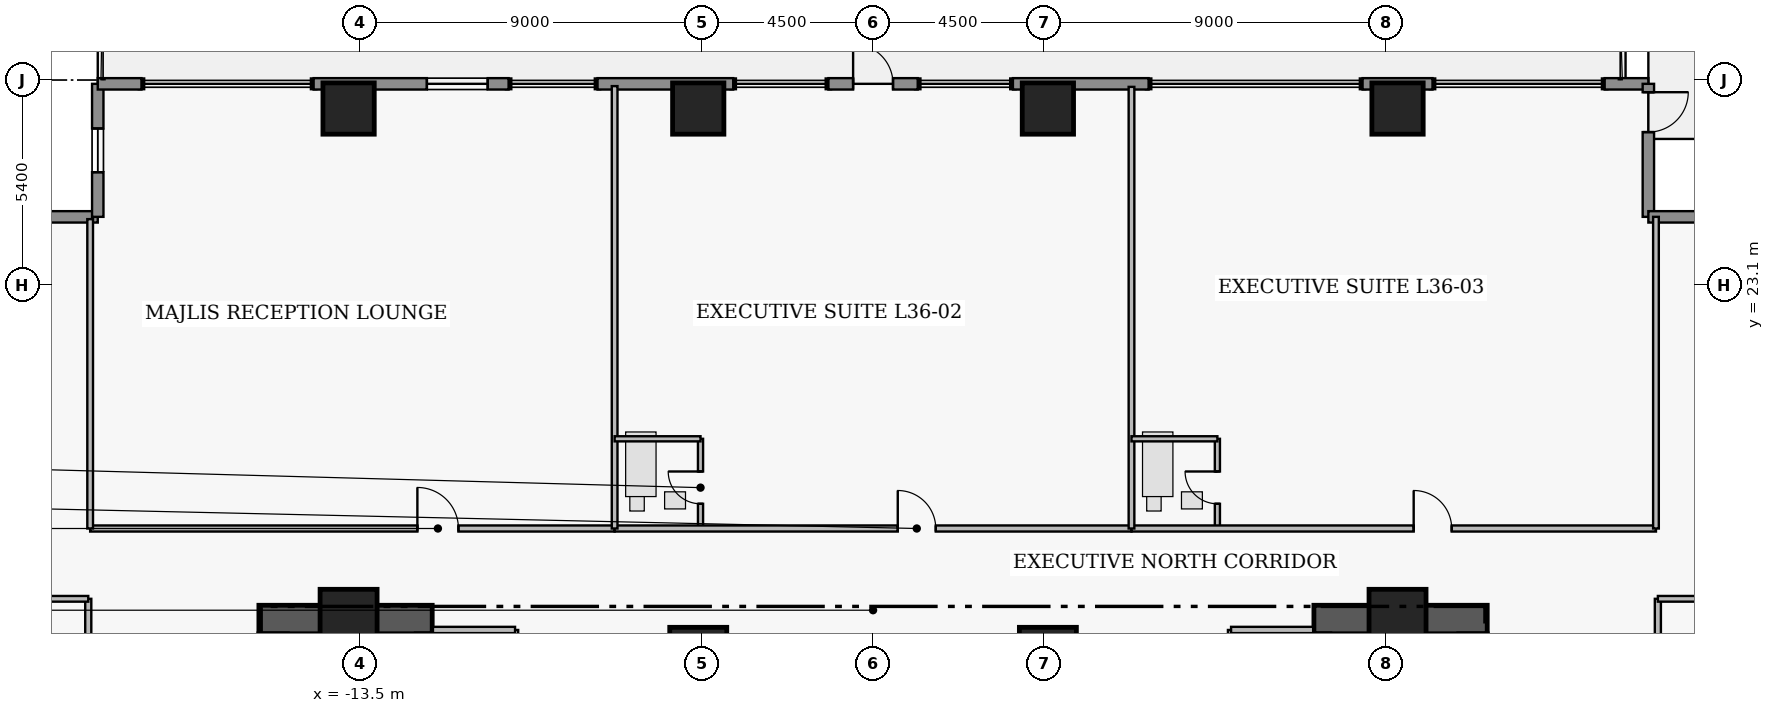
"""IFC4 building model, lengths in metres.
Left out: names, types, materials, properties, quantities, classifications, styles, units other than length and angle.
Written with IfcOpenShell. Run it as: python <this file> out.ifc"""

import sys

from ifc_helpers import new_model, si_unit, direction, frame, frame_2d, origin, origin_2d, place, context, subcontext, project, spatial, rectangle, extrude, element, fill, save


model = new_model("IFC4")
c1 = context("Model", 3, precision=1e-05, world=origin(), true_north=direction((0.0, 1.0)))
c2 = subcontext(c1, "Body", "Model", "MODEL_VIEW")
j1 = project(units=[si_unit("LENGTHUNIT", "METRE"), si_unit("PLANEANGLEUNIT", "RADIAN")], contexts=[c1])
p1 = place(None, origin())
s1 = spatial("IfcSite", under=j1, at=p1, CompositionType="ELEMENT")
p2 = place(p1, origin())
s2 = spatial("IfcBuilding", under=s1, at=p2, CompositionType="ELEMENT")
p3 = place(p2, frame((0.0, 0.0, 143.1)))
s3 = spatial("IfcBuildingStorey", under=s2, at=p3, CompositionType="ELEMENT", Elevation=143.1)
for number, where, z_axis, x_axis in (
    (1, (-16.16, 14.305, 0.0), (0.0, 0.0, 1.0), (1.0, 0.0, 0.0)),
    (2, (11.6, 14.305, 0.0), (0.0, 0.0, 1.0), (1.0, 0.0, 0.0)),
):
    element("IfcWall", number, at=place(p3, frame(where, z_axis=z_axis, x_axis=x_axis)), inside=s3, PredefinedType="SHEAR", context=c2, shape_type="SweptSolid", body=[
        extrude(rectangle(XDim=4.56, YDim=0.75, at=frame_2d((2.28, 0.0))), origin(), (0.0, 0.0, 1.0), 3.46),
    ])
for number, where, z_axis, x_axis in (
    (3, (-13.8, 14.35, 0.0), (0.0, 0.0, 1.0), (1.0, 0.0, 0.0)),
    (4, (-4.6, 13.35, 0.0), (0.0, 0.0, 1.0), (1.0, 0.0, 0.0)),
    (5, (4.6, 13.35, 0.0), (0.0, 0.0, 1.0), (1.0, 0.0, 0.0)),
    (6, (13.8, 14.35, 0.0), (0.0, 0.0, 1.0), (1.0, 0.0, 0.0)),
):
    element("IfcColumn", number, at=place(p3, frame(where, z_axis=z_axis, x_axis=x_axis)), inside=s3, PredefinedType="COLUMN", context=c2, shape_type="SweptSolid", body=[
        extrude(rectangle(XDim=1.5, YDim=1.5, at=origin_2d()), origin(), (0.0, 0.0, 1.0), 3.65),
    ])
for number, where, z_axis, x_axis in (
    (7, (-13.8, 27.75, 0.0), (0.0, 0.0, 1.0), (1.0, 0.0, 0.0)),
    (8, (-4.6, 27.75, 0.0), (0.0, 0.0, 1.0), (1.0, 0.0, 0.0)),
    (9, (4.6, 27.75, 0.0), (0.0, 0.0, 1.0), (1.0, 0.0, 0.0)),
    (10, (13.8, 27.75, 0.0), (0.0, 0.0, 1.0), (1.0, 0.0, 0.0)),
):
    element("IfcColumn", number, at=place(p3, frame(where, z_axis=z_axis, x_axis=x_axis)), inside=s3, PredefinedType="COLUMN", context=c2, shape_type="SweptSolid", body=[
        extrude(rectangle(XDim=1.35, YDim=1.35, at=origin_2d()), origin(), (0.0, 0.0, 1.0), 3.65),
    ])
p4 = place(p3, frame((-23.9, 24.9, 0.0), z_axis=(0.0, 0.0, 1.0), x_axis=(1.0, 0.0, 0.0)))
e11 = element("IfcWall", 11, at=p4, inside=s3, PredefinedType="STANDARD", context=c2, shape_type="SweptSolid", body=[
    extrude(rectangle(XDim=3.5, YDim=0.3, at=frame_2d((1.75, 0.0))), origin(), (0.0, 0.0, 1.0), 3.43),
])
p5 = place(p4, frame((1.065, 0.0, 1.25)))
e12 = element("IfcOpeningElement", 12, at=p5, cuts=e11, PredefinedType="OPENING", context=c2, shape_type="SweptSolid", body=[
    extrude(rectangle(XDim=1.15, YDim=1.55, at=frame_2d((0.575, 0.775))), frame((0.0, 0.16, 0.0), z_axis=(0.0, -1.0, 0.0), x_axis=(1.0, 0.0, 0.0)), (0.0, 0.0, 1.0), 0.32),
])
p6 = place(p3, frame((-20.4, 24.9, 0.0), z_axis=(0.0, 0.0, 1.0), x_axis=(0.0, 1.0, 0.0)))
e13 = element("IfcWall", 13, at=p6, inside=s3, PredefinedType="STANDARD", context=c2, shape_type="SweptSolid", body=[
    extrude(rectangle(XDim=3.5, YDim=0.3, at=frame_2d((1.75, 0.0))), origin(), (0.0, 0.0, 1.0), 3.43),
])
p7 = place(p6, frame((1.175, 0.0, 1.25)))
e14 = element("IfcOpeningElement", 14, at=p7, cuts=e13, PredefinedType="OPENING", context=c2, shape_type="SweptSolid", body=[
    extrude(rectangle(XDim=1.15, YDim=1.55, at=frame_2d((0.575, 0.775))), frame((0.0, 0.16, 0.0), z_axis=(0.0, -1.0, 0.0), x_axis=(1.0, 0.0, 0.0)), (0.0, 0.0, 1.0), 0.32),
])
p8 = place(p3, frame((-20.4, 28.4, 0.0), z_axis=(0.0, 0.0, 1.0), x_axis=(1.0, 0.0, 0.0)))
e15 = element("IfcWall", 15, at=p8, inside=s3, PredefinedType="STANDARD", context=c2, shape_type="SweptSolid", body=[
    extrude(rectangle(XDim=1.15, YDim=0.3, at=frame_2d((0.575, 0.0))), origin(), (0.0, 0.0, 1.0), 3.43),
])
p9 = place(p3, frame((-14.72, 28.4, 0.0), z_axis=(0.0, 0.0, 1.0), x_axis=(1.0, 0.0, 0.0)))
e16 = element("IfcWall", 16, at=p9, inside=s3, PredefinedType="STANDARD", context=c2, shape_type="SweptSolid", body=[
    extrude(rectangle(XDim=5.13, YDim=0.3, at=frame_2d((2.565, 0.0))), origin(), (0.0, 0.0, 1.0), 3.43),
])
p10 = place(p9, frame((2.98, 0.0, 0.85)))
e17 = element("IfcOpeningElement", 17, at=p10, cuts=e16, PredefinedType="OPENING", context=c2, shape_type="SweptSolid", body=[
    extrude(rectangle(XDim=1.6, YDim=1.8, at=frame_2d((0.8, 0.9))), frame((0.0, 0.16, 0.0), z_axis=(0.0, -1.0, 0.0), x_axis=(1.0, 0.0, 0.0)), (0.0, 0.0, 1.0), 0.32),
])
p11 = place(p3, frame((-7.25, 28.4, 0.0), z_axis=(0.0, 0.0, 1.0), x_axis=(1.0, 0.0, 0.0)))
e18 = element("IfcWall", 18, at=p11, inside=s3, PredefinedType="STANDARD", context=c2, shape_type="SweptSolid", body=[
    extrude(rectangle(XDim=3.57, YDim=0.3, at=frame_2d((1.785, 0.0))), origin(), (0.0, 0.0, 1.0), 3.43),
])
p12 = place(p3, frame((-1.175, 28.4, 0.0), z_axis=(0.0, 0.0, 1.0), x_axis=(1.0, 0.0, 0.0)))
e19 = element("IfcWall", 19, at=p12, inside=s3, PredefinedType="STANDARD", context=c2, shape_type="SweptSolid", body=[
    extrude(rectangle(XDim=2.35, YDim=0.3, at=frame_2d((1.175, 0.0))), origin(), (0.0, 0.0, 1.0), 3.43),
])
p13 = place(p12, frame((0.65, 0.0, 0.0)))
e20 = element("IfcOpeningElement", 20, at=p13, cuts=e19, PredefinedType="OPENING", context=c2, shape_type="SweptSolid", body=[
    extrude(rectangle(XDim=1.05, YDim=2.2, at=frame_2d((0.525, 1.1))), frame((0.0, 0.16, 0.0), z_axis=(0.0, -1.0, 0.0), x_axis=(1.0, 0.0, 0.0)), (0.0, 0.0, 1.0), 0.32),
])
p14 = place(p3, frame((3.68, 28.4, 0.0), z_axis=(0.0, 0.0, 1.0), x_axis=(1.0, 0.0, 0.0)))
e21 = element("IfcWall", 21, at=p14, inside=s3, PredefinedType="STANDARD", context=c2, shape_type="SweptSolid", body=[
    extrude(rectangle(XDim=3.57, YDim=0.3, at=frame_2d((1.785, 0.0))), origin(), (0.0, 0.0, 1.0), 3.43),
])
p15 = place(p3, frame((12.88, 28.4, 0.0), z_axis=(0.0, 0.0, 1.0), x_axis=(1.0, 0.0, 0.0)))
e22 = element("IfcWall", 22, at=p15, inside=s3, PredefinedType="STANDARD", context=c2, shape_type="SweptSolid", body=[
    extrude(rectangle(XDim=1.84, YDim=0.3, at=frame_2d((0.92, 0.0))), origin(), (0.0, 0.0, 1.0), 3.43),
])
p16 = place(p3, frame((19.25, 28.4, 0.0), z_axis=(0.0, 0.0, 1.0), x_axis=(1.0, 0.0, 0.0)))
e23 = element("IfcWall", 23, at=p16, inside=s3, PredefinedType="STANDARD", context=c2, shape_type="SweptSolid", body=[
    extrude(rectangle(XDim=1.15, YDim=0.3, at=frame_2d((0.575, 0.0))), origin(), (0.0, 0.0, 1.0), 3.43),
])
p17 = place(p3, frame((20.4, 28.4, 0.0), z_axis=(0.0, 0.0, 1.0), x_axis=(0.0, -1.0, 0.0)))
e24 = element("IfcWall", 24, at=p17, inside=s3, PredefinedType="STANDARD", context=c2, shape_type="SweptSolid", body=[
    extrude(rectangle(XDim=3.5, YDim=0.3, at=frame_2d((1.75, 0.0))), origin(), (0.0, 0.0, 1.0), 3.43),
])
p18 = place(p17, frame((0.22, 0.0, 0.0)))
e25 = element("IfcOpeningElement", 25, at=p18, cuts=e24, PredefinedType="OPENING", context=c2, shape_type="SweptSolid", body=[
    extrude(rectangle(XDim=1.05, YDim=2.2, at=frame_2d((0.525, 1.1))), frame((0.0, 0.16, 0.0), z_axis=(0.0, -1.0, 0.0), x_axis=(1.0, 0.0, 0.0)), (0.0, 0.0, 1.0), 0.32),
])
p19 = place(p3, frame((20.4, 24.9, 0.0), z_axis=(0.0, 0.0, 1.0), x_axis=(1.0, 0.0, 0.0)))
e26 = element("IfcWall", 26, at=p19, inside=s3, PredefinedType="STANDARD", context=c2, shape_type="SweptSolid", body=[
    extrude(rectangle(XDim=3.5, YDim=0.3, at=frame_2d((1.75, 0.0))), origin(), (0.0, 0.0, 1.0), 3.43),
])
p20 = place(p19, frame((1.285, 0.0, 1.25)))
e27 = element("IfcOpeningElement", 27, at=p20, cuts=e26, PredefinedType="OPENING", context=c2, shape_type="SweptSolid", body=[
    extrude(rectangle(XDim=1.15, YDim=1.55, at=frame_2d((0.575, 0.775))), frame((0.0, 0.16, 0.0), z_axis=(0.0, -1.0, 0.0), x_axis=(1.0, 0.0, 0.0)), (0.0, 0.0, 1.0), 0.32),
])
p21 = place(p3, frame((-20.6, 16.7, 0.0), z_axis=(0.0, 0.0, 1.0), x_axis=(1.0, 0.0, 0.0)))
e28 = element("IfcWall", 28, at=p21, inside=s3, PredefinedType="PARTITIONING", context=c2, shape_type="SweptSolid", body=[
    extrude(rectangle(XDim=13.8, YDim=0.16, at=frame_2d((6.9, 0.0))), origin(), (0.0, 0.0, 1.0), 2.973),
])
p22 = place(p21, frame((8.61, 0.0, 0.0)))
e29 = element("IfcOpeningElement", 29, at=p22, cuts=e28, PredefinedType="OPENING", context=c2, shape_type="SweptSolid", body=[
    extrude(rectangle(XDim=1.08, YDim=2.18, at=frame_2d((0.54, 1.09))), frame((0.0, 0.09, 0.0), z_axis=(0.0, -1.0, 0.0), x_axis=(1.0, 0.0, 0.0)), (0.0, 0.0, 1.0), 0.18),
])
p23 = place(p3, frame((-4.54, 16.7, 0.0), z_axis=(0.0, 0.0, 1.0), x_axis=(0.0, 1.0, 0.0)))
e30 = element("IfcWall", 30, at=p23, inside=s3, PredefinedType="PLUMBINGWALL", context=c2, shape_type="SweptSolid", body=[
    extrude(rectangle(XDim=2.36, YDim=0.135, at=frame_2d((1.18, 0.0))), origin(), (0.0, 0.0, 1.0), 2.503),
])
p24 = place(p23, frame((0.65, 0.0, 0.0)))
e31 = element("IfcOpeningElement", 31, at=p24, cuts=e30, PredefinedType="OPENING", context=c2, shape_type="SweptSolid", body=[
    extrude(rectangle(XDim=0.85, YDim=2.1, at=frame_2d((0.425, 1.05))), frame((0.0, 0.077, 0.0), z_axis=(0.0, -1.0, 0.0), x_axis=(1.0, 0.0, 0.0)), (0.0, 0.0, 1.0), 0.155),
])
p25 = place(p3, frame((-6.8, 16.7, 0.0), z_axis=(0.0, 0.0, 1.0), x_axis=(1.0, 0.0, 0.0)))
e32 = element("IfcWall", 32, at=p25, inside=s3, PredefinedType="PARTITIONING", context=c2, shape_type="SweptSolid", body=[
    extrude(rectangle(XDim=13.6, YDim=0.16, at=frame_2d((6.8, 0.0))), origin(), (0.0, 0.0, 1.0), 2.973),
])
p26 = place(p25, frame((7.45, 0.0, 0.0)))
e33 = element("IfcOpeningElement", 33, at=p26, cuts=e32, PredefinedType="OPENING", context=c2, shape_type="SweptSolid", body=[
    extrude(rectangle(XDim=1.0, YDim=2.15, at=frame_2d((0.5, 1.075))), frame((0.0, 0.09, 0.0), z_axis=(0.0, -1.0, 0.0), x_axis=(1.0, 0.0, 0.0)), (0.0, 0.0, 1.0), 0.18),
])
p27 = place(p3, frame((9.06, 16.7, 0.0), z_axis=(0.0, 0.0, 1.0), x_axis=(0.0, 1.0, 0.0)))
e34 = element("IfcWall", 34, at=p27, inside=s3, PredefinedType="PLUMBINGWALL", context=c2, shape_type="SweptSolid", body=[
    extrude(rectangle(XDim=2.36, YDim=0.135, at=frame_2d((1.18, 0.0))), origin(), (0.0, 0.0, 1.0), 3.43),
])
p28 = place(p27, frame((0.65, 0.0, 0.0)))
e35 = element("IfcOpeningElement", 35, at=p28, cuts=e34, PredefinedType="OPENING", context=c2, shape_type="SweptSolid", body=[
    extrude(rectangle(XDim=0.85, YDim=2.1, at=frame_2d((0.425, 1.05))), frame((0.0, 0.077, 0.0), z_axis=(0.0, -1.0, 0.0), x_axis=(1.0, 0.0, 0.0)), (0.0, 0.0, 1.0), 0.155),
])
p29 = place(p3, frame((6.8, 16.7, 0.0), z_axis=(0.0, 0.0, 1.0), x_axis=(1.0, 0.0, 0.0)))
e36 = element("IfcWall", 36, at=p29, inside=s3, PredefinedType="PARTITIONING", context=c2, shape_type="SweptSolid", body=[
    extrude(rectangle(XDim=13.8, YDim=0.16, at=frame_2d((6.9, 0.0))), origin(), (0.0, 0.0, 1.0), 2.973),
])
p30 = place(p29, frame((7.425, 0.0, 0.0)))
e37 = element("IfcOpeningElement", 37, at=p30, cuts=e36, PredefinedType="OPENING", context=c2, shape_type="SweptSolid", body=[
    extrude(rectangle(XDim=1.0, YDim=2.15, at=frame_2d((0.5, 1.075))), frame((0.0, 0.09, 0.0), z_axis=(0.0, -1.0, 0.0), x_axis=(1.0, 0.0, 0.0)), (0.0, 0.0, 1.0), 0.18),
])
p31 = place(p3, frame((20.65, 6.91, 0.0), z_axis=(0.0, 0.0, 1.0), x_axis=(0.0, 1.0, 0.0)))
e38 = element("IfcWall", 38, at=p31, inside=s3, PredefinedType="PARTITIONING", context=c2, shape_type="SweptSolid", body=[
    extrude(rectangle(XDim=7.94, YDim=0.16, at=frame_2d((3.97, 0.0))), origin(), (0.0, 0.0, 1.0), 3.43),
])
p32 = place(p31, frame((3.51, 0.0, 0.0)))
e39 = element("IfcOpeningElement", 39, at=p32, cuts=e38, PredefinedType="OPENING", context=c2, shape_type="SweptSolid", body=[
    extrude(rectangle(XDim=0.92, YDim=2.12, at=frame_2d((0.46, 1.06))), frame((0.0, 0.09, 0.0), z_axis=(0.0, -1.0, 0.0), x_axis=(1.0, 0.0, 0.0)), (0.0, 0.0, 1.0), 0.18),
])
p33 = place(p3, frame((-20.65, 1.55, 0.0), z_axis=(0.0, 0.0, 1.0), x_axis=(0.0, 1.0, 0.0)))
e40 = element("IfcWall", 40, at=p33, inside=s3, PredefinedType="PARTITIONING", context=c2, shape_type="SweptSolid", body=[
    extrude(rectangle(XDim=13.3, YDim=0.16, at=frame_2d((6.65, 0.0))), origin(), (0.0, 0.0, 1.0), 3.43),
])
p34 = place(p33, frame((6.175, 0.0, 0.0)))
e41 = element("IfcOpeningElement", 41, at=p34, cuts=e40, PredefinedType="OPENING", context=c2, shape_type="SweptSolid", body=[
    extrude(rectangle(XDim=0.95, YDim=2.15, at=frame_2d((0.475, 1.075))), frame((0.0, 0.09, 0.0), z_axis=(0.0, -1.0, 0.0), x_axis=(1.0, 0.0, 0.0)), (0.0, 0.0, 1.0), 0.18),
])
p35 = place(p3, frame((-9.42, 11.07, 0.0), z_axis=(0.0, 0.0, 1.0), x_axis=(0.0, 1.0, 0.0)))
e42 = element("IfcWall", 42, at=p35, inside=s3, PredefinedType="PARTITIONING", context=c2, shape_type="SweptSolid", body=[
    extrude(rectangle(XDim=2.96, YDim=0.165, at=frame_2d((1.48, 0.0))), origin(), (0.0, 0.0, 1.0), 3.43),
])
p36 = place(p3, frame((-11.58, 14.03, 0.0), z_axis=(0.0, 0.0, 1.0), x_axis=(1.0, 0.0, 0.0)))
e43 = element("IfcWall", 43, at=p36, inside=s3, PredefinedType="PARTITIONING", context=c2, shape_type="SweptSolid", body=[
    extrude(rectangle(XDim=2.16, YDim=0.165, at=frame_2d((1.08, 0.0))), origin(), (0.0, 0.0, 1.0), 3.43),
])
p37 = place(p3, frame((9.42, 11.07, 0.0), z_axis=(0.0, 0.0, 1.0), x_axis=(0.0, 1.0, 0.0)))
e44 = element("IfcWall", 44, at=p37, inside=s3, PredefinedType="PARTITIONING", context=c2, shape_type="SweptSolid", body=[
    extrude(rectangle(XDim=2.96, YDim=0.165, at=frame_2d((1.48, 0.0))), origin(), (0.0, 0.0, 1.0), 3.43),
])
p38 = place(p3, frame((9.42, 14.03, 0.0), z_axis=(0.0, 0.0, 1.0), x_axis=(1.0, 0.0, 0.0)))
e45 = element("IfcWall", 45, at=p38, inside=s3, PredefinedType="PARTITIONING", context=c2, shape_type="SweptSolid", body=[
    extrude(rectangle(XDim=2.16, YDim=0.165, at=frame_2d((1.08, 0.0))), origin(), (0.0, 0.0, 1.0), 3.43),
])
p39 = place(p3, frame((-20.6, 16.7, 0.0), z_axis=(0.0, 0.0, 1.0), x_axis=(0.0, 1.0, 0.0)))
e46 = element("IfcWall", 46, at=p39, inside=s3, PredefinedType="PARTITIONING", context=c2, shape_type="SweptSolid", body=[
    extrude(rectangle(XDim=8.14, YDim=0.15, at=frame_2d((4.07, 0.0))), origin(), (0.0, 0.0, 1.0), 3.43),
])
p40 = place(p3, frame((-6.8, 16.7, 0.0), z_axis=(0.0, 0.0, 1.0), x_axis=(0.0, 1.0, 0.0)))
e47 = element("IfcWall", 47, at=p40, inside=s3, PredefinedType="PARTITIONING", context=c2, shape_type="SweptSolid", body=[
    extrude(rectangle(XDim=11.64, YDim=0.15, at=frame_2d((5.82, 0.0))), origin(), (0.0, 0.0, 1.0), 3.43),
])
p41 = place(p3, frame((-6.8, 19.06, 0.0), z_axis=(0.0, 0.0, 1.0), x_axis=(1.0, 0.0, 0.0)))
e48 = element("IfcWall", 48, at=p41, inside=s3, PredefinedType="PLUMBINGWALL", context=c2, shape_type="SweptSolid", body=[
    extrude(rectangle(XDim=2.26, YDim=0.135, at=frame_2d((1.13, 0.0))), origin(), (0.0, 0.0, 1.0), 2.973),
])
p42 = place(p3, frame((6.8, 16.7, 0.0), z_axis=(0.0, 0.0, 1.0), x_axis=(0.0, 1.0, 0.0)))
e49 = element("IfcWall", 49, at=p42, inside=s3, PredefinedType="PARTITIONING", context=c2, shape_type="SweptSolid", body=[
    extrude(rectangle(XDim=11.62, YDim=0.15, at=frame_2d((5.81, 0.0))), origin(), (0.0, 0.0, 1.0), 3.43),
])
p43 = place(p3, frame((6.8, 19.06, 0.0), z_axis=(0.0, 0.0, 1.0), x_axis=(1.0, 0.0, 0.0)))
e50 = element("IfcWall", 50, at=p43, inside=s3, PredefinedType="PLUMBINGWALL", context=c2, shape_type="SweptSolid", body=[
    extrude(rectangle(XDim=2.26, YDim=0.135, at=frame_2d((1.13, 0.0))), origin(), (0.0, 0.0, 1.0), 2.973),
])
p44 = place(p3, frame((20.6, 16.7, 0.0), z_axis=(0.0, 0.0, 1.0), x_axis=(0.0, 1.0, 0.0)))
e51 = element("IfcWall", 51, at=p44, inside=s3, PredefinedType="PARTITIONING", context=c2, shape_type="SweptSolid", body=[
    extrude(rectangle(XDim=8.2, YDim=0.15, at=frame_2d((4.1, 0.0))), origin(), (0.0, 0.0, 1.0), 3.43),
])
for number, where, z_axis, x_axis in (
    (52, (20.65, 14.85, 0.0), (0.0, 0.0, 1.0), (1.0, 0.0, 0.0)),
    (53, (-23.84, 14.85, 0.0), (0.0, 0.0, 1.0), (1.0, 0.0, 0.0)),
):
    element("IfcWall", number, at=place(p3, frame(where, z_axis=z_axis, x_axis=x_axis)), inside=s3, PredefinedType="PARTITIONING", context=c2, shape_type="SweptSolid", body=[
        extrude(rectangle(XDim=3.19, YDim=0.15, at=frame_2d((1.595, 0.0))), origin(), (0.0, 0.0, 1.0), 3.43),
    ])
p45 = place(p7, origin())
e54 = element("IfcWindow", 54, at=p45, inside=s3, PartitioningType="SINGLE_PANEL", PredefinedType="WINDOW", context=c2, shape_type="SweptSolid", body=[
    extrude(rectangle(XDim=1.15, YDim=1.55, at=frame_2d((0.575, 0.775))), frame((0.0, 0.03, 0.0), z_axis=(0.0, -1.0, 0.0), x_axis=(1.0, 0.0, 0.0)), (0.0, 0.0, 1.0), 0.06),
])
fill(e14, e54)
p46 = place(p10, origin())
e55 = element("IfcWindow", 55, at=p46, inside=s3, PartitioningType="SINGLE_PANEL", PredefinedType="WINDOW", context=c2, shape_type="SweptSolid", body=[
    extrude(rectangle(XDim=1.6, YDim=1.8, at=frame_2d((0.8, 0.9))), frame((0.0, 0.03, 0.0), z_axis=(0.0, -1.0, 0.0), x_axis=(1.0, 0.0, 0.0)), (0.0, 0.0, 1.0), 0.06),
])
fill(e17, e55)
p47 = place(p13, origin())
e56 = element("IfcDoor", 56, at=p47, inside=s3, OperationType="SINGLE_SWING_LEFT", PredefinedType="DOOR", context=c2, shape_type="SweptSolid", body=[
    extrude(rectangle(XDim=1.05, YDim=2.2, at=frame_2d((0.525, 1.1))), frame((0.0, 0.025, 0.0), z_axis=(0.0, -1.0, 0.0), x_axis=(1.0, 0.0, 0.0)), (0.0, 0.0, 1.0), 0.05),
])
fill(e20, e56)
p48 = place(p18, origin())
e57 = element("IfcDoor", 57, at=p48, inside=s3, OperationType="SINGLE_SWING_LEFT", PredefinedType="DOOR", context=c2, shape_type="SweptSolid", body=[
    extrude(rectangle(XDim=1.05, YDim=2.2, at=frame_2d((0.525, 1.1))), frame((0.0, 0.025, 0.0), z_axis=(0.0, -1.0, 0.0), x_axis=(1.0, 0.0, 0.0)), (0.0, 0.0, 1.0), 0.05),
])
fill(e25, e57)
p49 = place(p22, origin())
e58 = element("IfcDoor", 58, at=p49, inside=s3, OperationType="SINGLE_SWING_LEFT", PredefinedType="DOOR", context=c2, shape_type="SweptSolid", body=[
    extrude(rectangle(XDim=1.08, YDim=2.18, at=frame_2d((0.54, 1.09))), frame((0.0, 0.025, 0.0), z_axis=(0.0, -1.0, 0.0), x_axis=(1.0, 0.0, 0.0)), (0.0, 0.0, 1.0), 0.05),
])
fill(e29, e58)
p50 = place(p24, origin())
e59 = element("IfcDoor", 59, at=p50, inside=s3, OperationType="SINGLE_SWING_RIGHT", PredefinedType="DOOR", context=c2, shape_type="SweptSolid", body=[
    extrude(rectangle(XDim=0.85, YDim=2.1, at=frame_2d((0.425, 1.05))), frame((0.0, 0.025, 0.0), z_axis=(0.0, -1.0, 0.0), x_axis=(1.0, 0.0, 0.0)), (0.0, 0.0, 1.0), 0.05),
])
fill(e31, e59)
p51 = place(p26, origin())
e60 = element("IfcDoor", 60, at=p51, inside=s3, OperationType="SINGLE_SWING_LEFT", PredefinedType="DOOR", context=c2, shape_type="SweptSolid", body=[
    extrude(rectangle(XDim=1.0, YDim=2.15, at=frame_2d((0.5, 1.075))), frame((0.0, 0.025, 0.0), z_axis=(0.0, -1.0, 0.0), x_axis=(1.0, 0.0, 0.0)), (0.0, 0.0, 1.0), 0.05),
])
fill(e33, e60)
p52 = place(p28, origin())
e61 = element("IfcDoor", 61, at=p52, inside=s3, OperationType="SINGLE_SWING_RIGHT", PredefinedType="DOOR", context=c2, shape_type="SweptSolid", body=[
    extrude(rectangle(XDim=0.85, YDim=2.1, at=frame_2d((0.425, 1.05))), frame((0.0, 0.025, 0.0), z_axis=(0.0, -1.0, 0.0), x_axis=(1.0, 0.0, 0.0)), (0.0, 0.0, 1.0), 0.05),
])
fill(e35, e61)
p53 = place(p30, origin())
e62 = element("IfcDoor", 62, at=p53, inside=s3, OperationType="SINGLE_SWING_LEFT", PredefinedType="DOOR", context=c2, shape_type="SweptSolid", body=[
    extrude(rectangle(XDim=1.0, YDim=2.15, at=frame_2d((0.5, 1.075))), frame((0.0, 0.025, 0.0), z_axis=(0.0, -1.0, 0.0), x_axis=(1.0, 0.0, 0.0)), (0.0, 0.0, 1.0), 0.05),
])
fill(e37, e62)
save(model, sys.argv[1])
